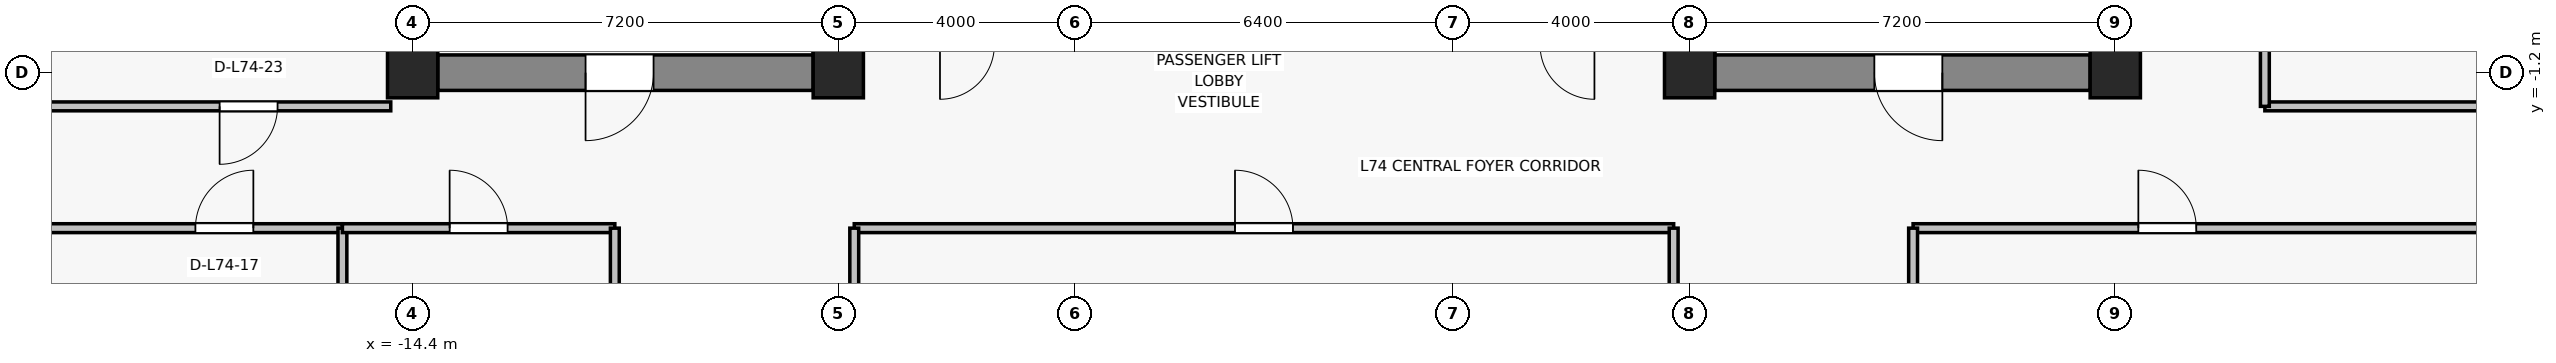
"""IFC4 building model, lengths in metres.
Left out: names, types, materials, properties, quantities, classifications, styles, units other than length and angle.
Written with IfcOpenShell. Run it as: python <this file> out.ifc"""

import sys

from ifc_helpers import new_model, si_unit, direction, frame, frame_2d, origin, origin_2d, place, context, subcontext, project, spatial, rectangle, extrude, source, transform, mapped, element, fill, save


model = new_model("IFC4")
c1 = context("Model", 3, precision=1e-05, world=origin(), true_north=direction((0.0, 1.0)))
c2 = subcontext(c1, "Body", "Model", "MODEL_VIEW")
j1 = project(units=[si_unit("LENGTHUNIT", "METRE"), si_unit("PLANEANGLEUNIT", "RADIAN")], contexts=[c1])
p1 = place(None, origin())
s1 = spatial("IfcSite", under=j1, at=p1, CompositionType="ELEMENT")
p2 = place(p1, origin())
s2 = spatial("IfcBuilding", under=s1, at=p2, CompositionType="ELEMENT")
p3 = place(p2, frame((0.0, 0.0, 261.7)))
s3 = spatial("IfcBuildingStorey", under=s2, at=p3, CompositionType="ELEMENT", Elevation=261.7)
for number, where, z_axis, x_axis in (
    (1, (-14.4, -1.2, 0.0), (0.0, 0.0, 1.0), (1.0, 0.0, 0.0)),
    (2, (-7.2, -1.2, 0.0), (0.0, 0.0, 1.0), (1.0, 0.0, 0.0)),
    (3, (7.2, -1.2, 0.0), (0.0, 0.0, 1.0), (1.0, 0.0, 0.0)),
    (4, (14.4, -1.2, 0.0), (0.0, 0.0, 1.0), (1.0, 0.0, 0.0)),
):
    element("IfcColumn", number, at=place(p3, frame(where, z_axis=z_axis, x_axis=x_axis)), inside=s3, PredefinedType="COLUMN", context=c2, shape_type="SweptSolid", body=[
        extrude(rectangle(XDim=0.85, YDim=0.85, at=origin_2d()), origin(), (0.0, 0.0, 1.0), 3.3),
    ])
p4 = place(p3, frame((-7.625, -1.2, 0.0), z_axis=(0.0, 0.0, 1.0), x_axis=(-1.0, 0.0, 0.0)))
e5 = element("IfcWall", 5, at=p4, inside=s3, PredefinedType="SHEAR", context=c2, shape_type="SweptSolid", body=[
    extrude(rectangle(XDim=6.35, YDim=0.6, at=frame_2d((3.175, 0.0))), origin(), (0.0, 0.0, 1.0), 3.075),
])
p5 = place(p4, frame((2.7, 0.0, 0.0)))
e6 = element("IfcOpeningElement", 6, at=p5, cuts=e5, PredefinedType="OPENING", context=c2, shape_type="SweptSolid", body=[
    extrude(rectangle(XDim=1.15, YDim=2.15, at=frame_2d((0.575, 1.075))), frame((0.0, 0.31, 0.0), z_axis=(0.0, -1.0, 0.0), x_axis=(1.0, 0.0, 0.0)), (0.0, 0.0, 1.0), 0.62),
])
p6 = place(p3, frame((13.975, -1.2, 0.0), z_axis=(0.0, 0.0, 1.0), x_axis=(-1.0, 0.0, 0.0)))
e7 = element("IfcWall", 7, at=p6, inside=s3, PredefinedType="SHEAR", context=c2, shape_type="SweptSolid", body=[
    extrude(rectangle(XDim=6.35, YDim=0.6, at=frame_2d((3.175, 0.0))), origin(), (0.0, 0.0, 1.0), 3.075),
])
p7 = place(p6, frame((2.5, 0.0, 0.0)))
e8 = element("IfcOpeningElement", 8, at=p7, cuts=e7, PredefinedType="OPENING", context=c2, shape_type="SweptSolid", body=[
    extrude(rectangle(XDim=1.15, YDim=2.15, at=frame_2d((0.575, 1.075))), frame((0.0, 0.31, 0.0), z_axis=(0.0, -1.0, 0.0), x_axis=(1.0, 0.0, 0.0)), (0.0, 0.0, 1.0), 0.62),
])
for number, where, z_axis, x_axis in (
    (9, (-7.4, -0.9, 0.0), (0.0, 0.0, 1.0), (0.0, 1.0, 0.0)),
    (10, (7.4, -0.9, 0.0), (0.0, 0.0, 1.0), (0.0, 1.0, 0.0)),
):
    element("IfcWall", number, at=place(p3, frame(where, z_axis=z_axis, x_axis=x_axis)), inside=s3, PredefinedType="SHEAR", context=c2, shape_type="SweptSolid", body=[
        extrude(rectangle(XDim=4.15, YDim=0.45, at=frame_2d((2.075, 0.0))), origin(), (0.0, 0.0, 1.0), 3.075),
    ])
p8 = place(p3, frame((-21.53, -3.83, 0.0), z_axis=(0.0, 0.0, 1.0), x_axis=(1.0, 0.0, 0.0)))
e11 = element("IfcWall", 11, at=p8, inside=s3, PredefinedType="PARTITIONING", context=c2, shape_type="SweptSolid", body=[
    extrude(rectangle(XDim=5.942, YDim=0.15, at=frame_2d((2.971, 0.0))), origin(), (0.0, 0.0, 1.0), 2.765),
])
p9 = place(p8, frame((3.456, 0.0, 0.0)))
e12 = element("IfcOpeningElement", 12, at=p9, cuts=e11, PredefinedType="OPENING", context=c2, shape_type="SweptSolid", body=[
    extrude(rectangle(XDim=0.98, YDim=2.15, at=frame_2d((0.49, 1.075))), frame((0.0, 0.085, 0.0), z_axis=(0.0, -1.0, 0.0), x_axis=(1.0, 0.0, 0.0)), (0.0, 0.0, 1.0), 0.17),
])
p10 = place(p3, frame((-15.588, -3.83, 0.0), z_axis=(0.0, 0.0, 1.0), x_axis=(0.0, -1.0, 0.0)))
e13 = element("IfcWall", 13, at=p10, inside=s3, PredefinedType="PARTITIONING", context=c2, shape_type="SweptSolid", body=[
    extrude(rectangle(XDim=6.89, YDim=0.15, at=frame_2d((3.445, 0.0))), origin(), (0.0, 0.0, 1.0), 2.615),
])
p11 = place(p3, frame((-15.588, -3.83, 0.0), z_axis=(0.0, 0.0, 1.0), x_axis=(1.0, 0.0, 0.0)))
e14 = element("IfcWall", 14, at=p11, inside=s3, PredefinedType="PARTITIONING", context=c2, shape_type="SweptSolid", body=[
    extrude(rectangle(XDim=4.608, YDim=0.15, at=frame_2d((2.304, 0.0))), origin(), (0.0, 0.0, 1.0), 2.615),
])
p12 = place(p11, frame((1.814, 0.0, 0.0)))
e15 = element("IfcOpeningElement", 15, at=p12, cuts=e14, PredefinedType="OPENING", context=c2, shape_type="SweptSolid", body=[
    extrude(rectangle(XDim=0.98, YDim=2.15, at=frame_2d((0.49, 1.075))), frame((0.0, 0.085, 0.0), z_axis=(0.0, -1.0, 0.0), x_axis=(1.0, 0.0, 0.0)), (0.0, 0.0, 1.0), 0.17),
])
p13 = place(p3, frame((-10.98, -3.83, 0.0), z_axis=(0.0, 0.0, 1.0), x_axis=(0.0, -1.0, 0.0)))
e16 = element("IfcWall", 16, at=p13, inside=s3, PredefinedType="PARTITIONING", context=c2, shape_type="SweptSolid", body=[
    extrude(rectangle(XDim=6.89, YDim=0.15, at=frame_2d((3.445, 0.0))), origin(), (0.0, 0.0, 1.0), 2.615),
])
p14 = place(p3, frame((10.98, -3.83, 0.0), z_axis=(0.0, 0.0, 1.0), x_axis=(1.0, 0.0, 0.0)))
e17 = element("IfcWall", 17, at=p14, inside=s3, PredefinedType="PARTITIONING", context=c2, shape_type="SweptSolid", body=[
    extrude(rectangle(XDim=10.55, YDim=0.15, at=frame_2d((5.275, 0.0))), origin(), (0.0, 0.0, 1.0), 2.615),
])
p15 = place(p14, frame((3.81, 0.0, 0.0)))
e18 = element("IfcOpeningElement", 18, at=p15, cuts=e17, PredefinedType="OPENING", context=c2, shape_type="SweptSolid", body=[
    extrude(rectangle(XDim=0.98, YDim=2.15, at=frame_2d((0.49, 1.075))), frame((0.0, 0.085, 0.0), z_axis=(0.0, -1.0, 0.0), x_axis=(1.0, 0.0, 0.0)), (0.0, 0.0, 1.0), 0.17),
])
p16 = place(p3, frame((10.98, -10.72, 0.0), z_axis=(0.0, 0.0, 1.0), x_axis=(0.0, 1.0, 0.0)))
e19 = element("IfcWall", 19, at=p16, inside=s3, PredefinedType="PARTITIONING", context=c2, shape_type="SweptSolid", body=[
    extrude(rectangle(XDim=6.89, YDim=0.15, at=frame_2d((3.445, 0.0))), origin(), (0.0, 0.0, 1.0), 2.615),
])
p17 = place(p3, frame((-6.93, -3.83, 0.0), z_axis=(0.0, 0.0, 1.0), x_axis=(1.0, 0.0, 0.0)))
e20 = element("IfcWall", 20, at=p17, inside=s3, PredefinedType="PARTITIONING", context=c2, shape_type="SweptSolid", body=[
    extrude(rectangle(XDim=13.86, YDim=0.15, at=frame_2d((6.93, 0.0))), origin(), (0.0, 0.0, 1.0), 2.615),
])
p18 = place(p17, frame((6.44, 0.0, 0.0)))
e21 = element("IfcOpeningElement", 21, at=p18, cuts=e20, PredefinedType="OPENING", context=c2, shape_type="SweptSolid", body=[
    extrude(rectangle(XDim=0.98, YDim=2.15, at=frame_2d((0.49, 1.075))), frame((0.0, 0.085, 0.0), z_axis=(0.0, -1.0, 0.0), x_axis=(1.0, 0.0, 0.0)), (0.0, 0.0, 1.0), 0.17),
])
for number, where, z_axis, x_axis in (
    (22, (-6.93, -9.205, 0.0), (0.0, 0.0, 1.0), (0.0, 1.0, 0.0)),
    (23, (6.93, -3.83, 0.0), (0.0, 0.0, 1.0), (0.0, -1.0, 0.0)),
):
    element("IfcWall", number, at=place(p3, frame(where, z_axis=z_axis, x_axis=x_axis)), inside=s3, PredefinedType="PARTITIONING", context=c2, shape_type="SweptSolid", body=[
        extrude(rectangle(XDim=5.375, YDim=0.15, at=frame_2d((2.688, 0.0))), origin(), (0.0, 0.0, 1.0), 2.615),
    ])
p19 = place(p3, frame((-14.77, -1.77, 0.0), z_axis=(0.0, 0.0, 1.0), x_axis=(-1.0, 0.0, 0.0)))
e24 = element("IfcWall", 24, at=p19, inside=s3, PredefinedType="PARTITIONING", context=c2, shape_type="SweptSolid", body=[
    extrude(rectangle(XDim=6.76, YDim=0.15, at=frame_2d((3.38, 0.0))), origin(), (0.0, 0.0, 1.0), 2.765),
])
p20 = place(p19, frame((1.915, 0.0, 0.0)))
e25 = element("IfcOpeningElement", 25, at=p20, cuts=e24, PredefinedType="OPENING", context=c2, shape_type="SweptSolid", body=[
    extrude(rectangle(XDim=0.98, YDim=2.15, at=frame_2d((0.49, 1.075))), frame((0.0, 0.085, 0.0), z_axis=(0.0, -1.0, 0.0), x_axis=(1.0, 0.0, 0.0)), (0.0, 0.0, 1.0), 0.17),
])
p21 = place(p3, frame((21.53, -1.77, 0.0), z_axis=(0.0, 0.0, 1.0), x_axis=(-1.0, 0.0, 0.0)))
e26 = element("IfcWall", 26, at=p21, inside=s3, PredefinedType="PARTITIONING", context=c2, shape_type="SweptSolid", body=[
    extrude(rectangle(XDim=4.6, YDim=0.15, at=frame_2d((2.3, 0.0))), origin(), (0.0, 0.0, 1.0), 2.765),
])
p22 = place(p3, frame((16.93, -1.77, 0.0), z_axis=(0.0, 0.0, 1.0), x_axis=(0.0, 1.0, 0.0)))
e27 = element("IfcWall", 27, at=p22, inside=s3, PredefinedType="PARTITIONING", context=c2, shape_type="SweptSolid", body=[
    extrude(rectangle(XDim=5.068, YDim=0.15, at=frame_2d((2.534, 0.0))), origin(), (0.0, 0.0, 1.0), 2.615),
])
p23 = place(p22, frame((2.044, 0.0, 0.0)))
e28 = element("IfcOpeningElement", 28, at=p23, cuts=e27, PredefinedType="OPENING", context=c2, shape_type="SweptSolid", body=[
    extrude(rectangle(XDim=0.98, YDim=2.15, at=frame_2d((0.49, 1.075))), frame((0.0, 0.085, 0.0), z_axis=(0.0, -1.0, 0.0), x_axis=(1.0, 0.0, 0.0)), (0.0, 0.0, 1.0), 0.17),
])
m1 = source(origin(), c2, "Body", "SweptSolid", [
    extrude(rectangle(XDim=1.15, YDim=2.15, at=frame_2d((0.575, 1.075))), frame((0.0, 0.025, 0.0), z_axis=(0.0, -1.0, 0.0), x_axis=(1.0, 0.0, 0.0)), (0.0, 0.0, 1.0), 0.05),
])
p24 = place(p5, origin())
e29 = element("IfcDoor", 29, at=p24, inside=s3, OperationType="SINGLE_SWING_RIGHT", PredefinedType="DOOR", context=c2, shape_type="MappedRepresentation", body=[
    mapped(m1, transform((0.0, 0.0, 0.0), x_axis=(1.0, 0.0, 0.0), y_axis=(0.0, 1.0, 0.0), z_axis=(0.0, 0.0, 1.0), scale=1.0)),
])
fill(e6, e29)
p25 = place(p7, origin())
e30 = element("IfcDoor", 30, at=p25, inside=s3, OperationType="SINGLE_SWING_LEFT", PredefinedType="DOOR", context=c2, shape_type="MappedRepresentation", body=[
    mapped(m1, transform((0.0, 0.0, 0.0), x_axis=(1.0, 0.0, 0.0), y_axis=(0.0, 1.0, 0.0), z_axis=(0.0, 0.0, 1.0), scale=1.0)),
])
fill(e8, e30)
m2 = source(origin(), c2, "Body", "SweptSolid", [
    extrude(rectangle(XDim=0.98, YDim=2.15, at=frame_2d((0.49, 1.075))), frame((0.0, 0.025, 0.0), z_axis=(0.0, -1.0, 0.0), x_axis=(1.0, 0.0, 0.0)), (0.0, 0.0, 1.0), 0.05),
])
p26 = place(p9, origin())
e31 = element("IfcDoor", 31, at=p26, inside=s3, OperationType="SINGLE_SWING_RIGHT", PredefinedType="DOOR", context=c2, shape_type="MappedRepresentation", body=[
    mapped(m2, transform((0.0, 0.0, 0.0), x_axis=(1.0, 0.0, 0.0), y_axis=(0.0, 1.0, 0.0), z_axis=(0.0, 0.0, 1.0), scale=1.0)),
])
fill(e12, e31)
p27 = place(p12, origin())
e32 = element("IfcDoor", 32, at=p27, inside=s3, OperationType="SINGLE_SWING_LEFT", PredefinedType="DOOR", context=c2, shape_type="MappedRepresentation", body=[
    mapped(m2, transform((0.0, 0.0, 0.0), x_axis=(1.0, 0.0, 0.0), y_axis=(0.0, 1.0, 0.0), z_axis=(0.0, 0.0, 1.0), scale=1.0)),
])
fill(e15, e32)
p28 = place(p15, origin())
e33 = element("IfcDoor", 33, at=p28, inside=s3, OperationType="SINGLE_SWING_LEFT", PredefinedType="DOOR", context=c2, shape_type="MappedRepresentation", body=[
    mapped(m2, transform((0.0, 0.0, 0.0), x_axis=(1.0, 0.0, 0.0), y_axis=(0.0, 1.0, 0.0), z_axis=(0.0, 0.0, 1.0), scale=1.0)),
])
fill(e18, e33)
p29 = place(p18, origin())
e34 = element("IfcDoor", 34, at=p29, inside=s3, OperationType="SINGLE_SWING_LEFT", PredefinedType="DOOR", context=c2, shape_type="MappedRepresentation", body=[
    mapped(m2, transform((0.0, 0.0, 0.0), x_axis=(1.0, 0.0, 0.0), y_axis=(0.0, 1.0, 0.0), z_axis=(0.0, 0.0, 1.0), scale=1.0)),
])
fill(e21, e34)
p30 = place(p20, origin())
e35 = element("IfcDoor", 35, at=p30, inside=s3, OperationType="SINGLE_SWING_RIGHT", PredefinedType="DOOR", context=c2, shape_type="MappedRepresentation", body=[
    mapped(m2, transform((0.0, 0.0, 0.0), x_axis=(1.0, 0.0, 0.0), y_axis=(0.0, 1.0, 0.0), z_axis=(0.0, 0.0, 1.0), scale=1.0)),
])
fill(e25, e35)
save(model, sys.argv[1])
